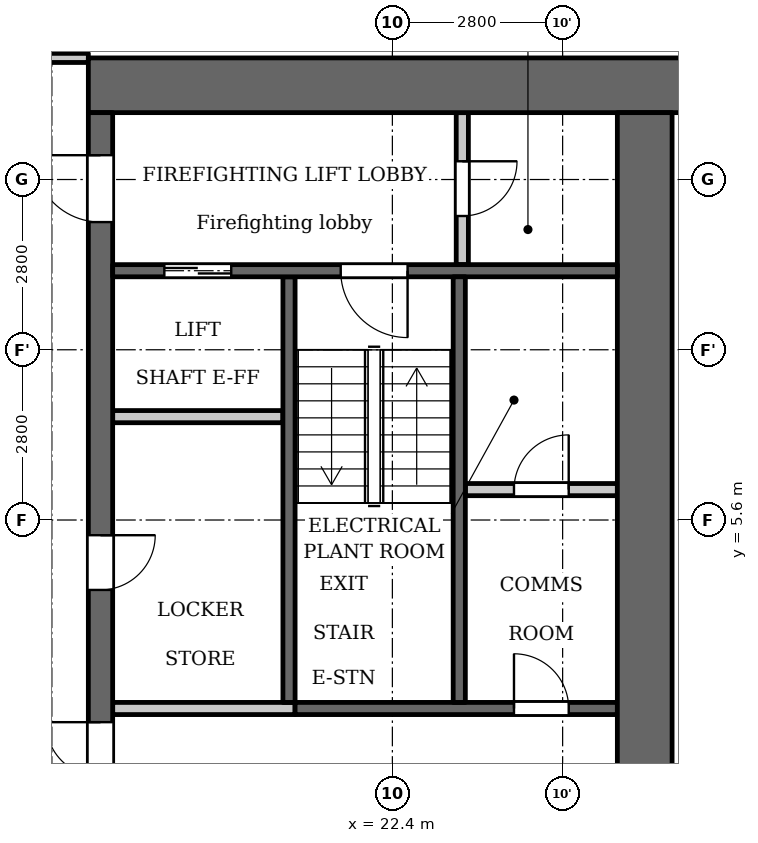
"""IFC4 building model, lengths in metres.
Left out: names, types, materials, properties, quantities, classifications, styles, units other than length and angle.
Written with IfcOpenShell. Run it as: python <this file> out.ifc"""

import sys

from ifc_helpers import new_model, si_unit, direction, frame, frame_2d, origin, place, context, subcontext, project, spatial, rectangle, extrude, element, fill, save


model = new_model("IFC4")
c1 = context("Model", 3, precision=1e-05, world=origin(), true_north=direction((0.0, 1.0)))
c2 = subcontext(c1, "Body", "Model", "MODEL_VIEW")
j1 = project(units=[si_unit("LENGTHUNIT", "METRE"), si_unit("PLANEANGLEUNIT", "RADIAN")], contexts=[c1])
p1 = place(None, origin())
s1 = spatial("IfcSite", under=j1, at=p1, CompositionType="ELEMENT")
p2 = place(p1, origin())
s2 = spatial("IfcBuilding", under=s1, at=p2, CompositionType="ELEMENT")
p3 = place(p2, frame((0.0, 0.0, 55.0)))
s3 = spatial("IfcBuildingStorey", under=s2, at=p3, CompositionType="ELEMENT", Elevation=55.0)
p4 = place(p3, frame((20.7, 2.6, 0.0), z_axis=(0.0, 0.0, 1.0), x_axis=(0.0, 1.0, 0.0)))
e1 = element("IfcWall", 1, at=p4, inside=s3, PredefinedType="SHEAR", context=c2, shape_type="SweptSolid", body=[
    extrude(rectangle(XDim=7.0, YDim=0.2, at=frame_2d((3.5, 0.0))), origin(), (0.0, 0.0, 1.0), 3.2),
])
p5 = place(p3, frame((20.8, 2.5, 0.0), z_axis=(0.0, 0.0, 1.0), x_axis=(1.0, 0.0, 0.0)))
e2 = element("IfcWall", 2, at=p5, inside=s3, PredefinedType="SHEAR", context=c2, shape_type="SweptSolid", body=[
    extrude(rectangle(XDim=5.3, YDim=0.2, at=frame_2d((2.65, 0.0))), origin(), (0.0, 0.0, 1.0), 3.2),
])
p6 = place(p5, frame((3.6, 0.0, 0.0)))
e3 = element("IfcOpeningElement", 3, at=p6, cuts=e2, PredefinedType="OPENING", context=c2, shape_type="SweptSolid", body=[
    extrude(rectangle(XDim=0.9, YDim=2.1, at=frame_2d((0.45, 1.05))), frame((0.0, 0.11, 0.0), z_axis=(0.0, -1.0, 0.0), x_axis=(1.0, 0.0, 0.0)), (0.0, 0.0, 1.0), 0.22),
])
p7 = place(p3, frame((17.4, 12.75, 0.0), z_axis=(0.0, 0.0, 1.0), x_axis=(1.0, 0.0, 0.0)))
e4 = element("IfcWall", 4, at=p7, inside=s3, PredefinedType="SHEAR", context=c2, shape_type="SweptSolid", body=[
    extrude(rectangle(XDim=10.4, YDim=0.9, at=frame_2d((5.2, 0.0))), origin(), (0.0, 0.0, 1.0), 3.2),
])
p8 = place(p3, frame((17.6, -12.3, 0.0), z_axis=(0.0, 0.0, 1.0), x_axis=(0.0, 1.0, 0.0)))
e5 = element("IfcWall", 5, at=p8, inside=s3, PredefinedType="SHEAR", context=c2, shape_type="SweptSolid", body=[
    extrude(rectangle(XDim=24.6, YDim=0.4, at=frame_2d((12.3, 0.0))), origin(), (0.0, 0.0, 1.0), 3.2),
])
p9 = place(p8, frame((6.0, 0.0, 0.0)))
e6 = element("IfcOpeningElement", 6, at=p9, cuts=e5, PredefinedType="OPENING", context=c2, shape_type="SweptSolid", body=[
    extrude(rectangle(XDim=1.1, YDim=2.1, at=frame_2d((0.55, 1.05))), frame((0.0, 0.21, 0.0), z_axis=(0.0, -1.0, 0.0), x_axis=(1.0, 0.0, 0.0)), (0.0, 0.0, 1.0), 0.42),
])
p10 = place(p8, frame((8.4, 0.0, 0.0)))
e7 = element("IfcOpeningElement", 7, at=p10, cuts=e5, PredefinedType="OPENING", context=c2, shape_type="SweptSolid", body=[
    extrude(rectangle(XDim=1.1, YDim=2.1, at=frame_2d((0.55, 1.05))), frame((0.0, 0.21, 0.0), z_axis=(0.0, -1.0, 0.0), x_axis=(1.0, 0.0, 0.0)), (0.0, 0.0, 1.0), 0.42),
])
p11 = place(p8, frame((10.8, 0.0, 0.0)))
e8 = element("IfcOpeningElement", 8, at=p11, cuts=e5, PredefinedType="OPENING", context=c2, shape_type="SweptSolid", body=[
    extrude(rectangle(XDim=1.1, YDim=2.1, at=frame_2d((0.55, 1.05))), frame((0.0, 0.21, 0.0), z_axis=(0.0, -1.0, 0.0), x_axis=(1.0, 0.0, 0.0)), (0.0, 0.0, 1.0), 0.42),
])
p12 = place(p8, frame((16.75, 0.0, 0.0)))
e9 = element("IfcOpeningElement", 9, at=p12, cuts=e5, PredefinedType="OPENING", context=c2, shape_type="SweptSolid", body=[
    extrude(rectangle(XDim=0.9, YDim=2.1, at=frame_2d((0.45, 1.05))), frame((0.0, 0.21, 0.0), z_axis=(0.0, -1.0, 0.0), x_axis=(1.0, 0.0, 0.0)), (0.0, 0.0, 1.0), 0.42),
])
p13 = place(p8, frame((22.8, 0.0, 0.0)))
e10 = element("IfcOpeningElement", 10, at=p13, cuts=e5, PredefinedType="OPENING", context=c2, shape_type="SweptSolid", body=[
    extrude(rectangle(XDim=1.1, YDim=2.1, at=frame_2d((0.55, 1.05))), frame((0.0, 0.21, 0.0), z_axis=(0.0, -1.0, 0.0), x_axis=(1.0, 0.0, 0.0)), (0.0, 0.0, 1.0), 0.42),
])
p14 = place(p8, frame((0.7, 0.0, 0.0)))
e11 = element("IfcOpeningElement", 11, at=p14, cuts=e5, PredefinedType="OPENING", context=c2, shape_type="SweptSolid", body=[
    extrude(rectangle(XDim=1.1, YDim=2.1, at=frame_2d((0.55, 1.05))), frame((0.0, 0.21, 0.0), z_axis=(0.0, -1.0, 0.0), x_axis=(1.0, 0.0, 0.0)), (0.0, 0.0, 1.0), 0.42),
])
p15 = place(p8, frame((12.775, 0.0, 0.0)))
e12 = element("IfcOpeningElement", 12, at=p15, cuts=e5, PredefinedType="OPENING", context=c2, shape_type="SweptSolid", body=[
    extrude(rectangle(XDim=1.8, YDim=2.1, at=frame_2d((0.9, 1.05))), frame((0.0, 0.21, 0.0), z_axis=(0.0, -1.0, 0.0), x_axis=(1.0, 0.0, 0.0)), (0.0, 0.0, 1.0), 0.42),
])
p16 = place(p3, frame((26.55, -12.3, 0.0), z_axis=(0.0, 0.0, 1.0), x_axis=(0.0, 1.0, 0.0)))
e13 = element("IfcWall", 13, at=p16, inside=s3, PredefinedType="SHEAR", context=c2, shape_type="SweptSolid", body=[
    extrude(rectangle(XDim=24.6, YDim=0.9, at=frame_2d((12.3, 0.0))), origin(), (0.0, 0.0, 1.0), 3.2),
])
p17 = place(p3, frame((23.55, 9.8, 0.0), z_axis=(0.0, 0.0, 1.0), x_axis=(0.0, 1.0, 0.0)))
e14 = element("IfcWall", 14, at=p17, inside=s3, PredefinedType="PARTITIONING", context=c2, shape_type="SweptSolid", body=[
    extrude(rectangle(XDim=2.5, YDim=0.2, at=frame_2d((1.25, 0.0))), origin(), (0.0, 0.0, 1.0), 3.2),
])
p18 = place(p17, frame((0.8, 0.0, 0.0)))
e15 = element("IfcOpeningElement", 15, at=p18, cuts=e14, PredefinedType="OPENING", context=c2, shape_type="SweptSolid", body=[
    extrude(rectangle(XDim=0.9, YDim=2.1, at=frame_2d((0.45, 1.05))), frame((0.0, 0.11, 0.0), z_axis=(0.0, -1.0, 0.0), x_axis=(1.0, 0.0, 0.0)), (0.0, 0.0, 1.0), 0.22),
])
p19 = place(p3, frame((23.6, 6.1, 0.0), z_axis=(0.0, 0.0, 1.0), x_axis=(1.0, 0.0, 0.0)))
e16 = element("IfcWall", 16, at=p19, inside=s3, PredefinedType="PARTITIONING", context=c2, shape_type="SweptSolid", body=[
    extrude(rectangle(XDim=2.5, YDim=0.2, at=frame_2d((1.25, 0.0))), origin(), (0.0, 0.0, 1.0), 3.2),
])
p20 = place(p19, frame((0.8, 0.0, 0.0)))
e17 = element("IfcOpeningElement", 17, at=p20, cuts=e16, PredefinedType="OPENING", context=c2, shape_type="SweptSolid", body=[
    extrude(rectangle(XDim=0.9, YDim=2.1, at=frame_2d((0.45, 1.05))), frame((0.0, 0.11, 0.0), z_axis=(0.0, -1.0, 0.0), x_axis=(1.0, 0.0, 0.0)), (0.0, 0.0, 1.0), 0.22),
])
p21 = place(p3, frame((17.8, 2.5, 0.0), z_axis=(0.0, 0.0, 1.0), x_axis=(1.0, 0.0, 0.0)))
e18 = element("IfcWall", 18, at=p21, inside=s3, PredefinedType="PARTITIONING", context=c2, shape_type="SweptSolid", body=[
    extrude(rectangle(XDim=3.0, YDim=0.2, at=frame_2d((1.5, 0.0))), origin(), (0.0, 0.0, 1.0), 3.2),
])
p22 = place(p3, frame((17.8, 7.3, 0.0), z_axis=(0.0, 0.0, 1.0), x_axis=(1.0, 0.0, 0.0)))
e19 = element("IfcWall", 19, at=p22, inside=s3, PredefinedType="PARTITIONING", context=c2, shape_type="SweptSolid", body=[
    extrude(rectangle(XDim=2.8, YDim=0.2, at=frame_2d((1.4, 0.0))), origin(), (0.0, 0.0, 1.0), 3.2),
])
p23 = place(p3, frame((17.8, 9.7, 0.0), z_axis=(0.0, 0.0, 1.0), x_axis=(1.0, 0.0, 0.0)))
e20 = element("IfcWall", 20, at=p23, inside=s3, PredefinedType="SHEAR", context=c2, shape_type="SweptSolid", body=[
    extrude(rectangle(XDim=8.3, YDim=0.2, at=frame_2d((4.15, 0.0))), origin(), (0.0, 0.0, 1.0), 3.2),
])
p24 = place(p23, frame((0.85, 0.0, 0.0)))
e21 = element("IfcOpeningElement", 21, at=p24, cuts=e20, PredefinedType="OPENING", context=c2, shape_type="SweptSolid", body=[
    extrude(rectangle(XDim=1.1, YDim=2.1, at=frame_2d((0.55, 1.05))), frame((0.0, 0.11, 0.0), z_axis=(0.0, -1.0, 0.0), x_axis=(1.0, 0.0, 0.0)), (0.0, 0.0, 1.0), 0.22),
])
p25 = place(p23, frame((3.75, 0.0, 0.0)))
e22 = element("IfcOpeningElement", 22, at=p25, cuts=e20, PredefinedType="OPENING", context=c2, shape_type="SweptSolid", body=[
    extrude(rectangle(XDim=1.1, YDim=2.1, at=frame_2d((0.55, 1.05))), frame((0.0, 0.11, 0.0), z_axis=(0.0, -1.0, 0.0), x_axis=(1.0, 0.0, 0.0)), (0.0, 0.0, 1.0), 0.22),
])
p26 = place(p3, frame((23.5, 2.6, 0.0), z_axis=(0.0, 0.0, 1.0), x_axis=(0.0, 1.0, 0.0)))
e23 = element("IfcWall", 23, at=p26, inside=s3, PredefinedType="SHEAR", context=c2, shape_type="SweptSolid", body=[
    extrude(rectangle(XDim=7.0, YDim=0.2, at=frame_2d((3.5, 0.0))), origin(), (0.0, 0.0, 1.0), 3.2),
])
p27 = place(p3, frame((-17.4, 13.2, 0.0), z_axis=(0.0, 0.0, 1.0), x_axis=(1.0, 0.0, 0.0)))
e24 = element("IfcWall", 24, at=p27, inside=s3, PredefinedType="PARTITIONING", context=c2, shape_type="SweptSolid", body=[
    extrude(rectangle(XDim=34.8, YDim=0.15, at=frame_2d((17.4, 0.0))), origin(), (0.0, 0.0, 1.0), 3.2),
])
p28 = place(p27, frame((0.75, 0.0, 0.0)))
e25 = element("IfcOpeningElement", 25, at=p28, cuts=e24, PredefinedType="OPENING", context=c2, shape_type="SweptSolid", body=[
    extrude(rectangle(XDim=1.0, YDim=2.1, at=frame_2d((0.5, 1.05))), frame((0.0, 0.085, 0.0), z_axis=(0.0, -1.0, 0.0), x_axis=(1.0, 0.0, 0.0)), (0.0, 0.0, 1.0), 0.17),
])
p29 = place(p27, frame((33.15, 0.0, 0.0)))
e26 = element("IfcOpeningElement", 26, at=p29, cuts=e24, PredefinedType="OPENING", context=c2, shape_type="SweptSolid", body=[
    extrude(rectangle(XDim=1.0, YDim=2.1, at=frame_2d((0.5, 1.05))), frame((0.0, 0.085, 0.0), z_axis=(0.0, -1.0, 0.0), x_axis=(1.0, 0.0, 0.0)), (0.0, 0.0, 1.0), 0.17),
])
p30 = place(p27, frame((6.85, 0.0, 0.0)))
e27 = element("IfcOpeningElement", 27, at=p30, cuts=e24, PredefinedType="OPENING", context=c2, shape_type="SweptSolid", body=[
    extrude(rectangle(XDim=1.0, YDim=2.1, at=frame_2d((0.5, 1.05))), frame((0.0, 0.085, 0.0), z_axis=(0.0, -1.0, 0.0), x_axis=(1.0, 0.0, 0.0)), (0.0, 0.0, 1.0), 0.17),
])
p31 = place(p27, frame((18.05, 0.0, 0.0)))
e28 = element("IfcOpeningElement", 28, at=p31, cuts=e24, PredefinedType="OPENING", context=c2, shape_type="SweptSolid", body=[
    extrude(rectangle(XDim=1.0, YDim=2.1, at=frame_2d((0.5, 1.05))), frame((0.0, 0.085, 0.0), z_axis=(0.0, -1.0, 0.0), x_axis=(1.0, 0.0, 0.0)), (0.0, 0.0, 1.0), 0.17),
])
p32 = place(p27, frame((29.25, 0.0, 0.0)))
e29 = element("IfcOpeningElement", 29, at=p32, cuts=e24, PredefinedType="OPENING", context=c2, shape_type="SweptSolid", body=[
    extrude(rectangle(XDim=1.0, YDim=2.1, at=frame_2d((0.5, 1.05))), frame((0.0, 0.085, 0.0), z_axis=(0.0, -1.0, 0.0), x_axis=(1.0, 0.0, 0.0)), (0.0, 0.0, 1.0), 0.17),
])
p33 = place(p12, origin())
e30 = element("IfcDoor", 30, at=p33, inside=s3, OperationType="SINGLE_SWING_RIGHT", PredefinedType="DOOR", context=c2, shape_type="SweptSolid", body=[
    extrude(rectangle(XDim=0.9, YDim=2.1, at=frame_2d((0.45, 1.05))), frame((0.0, 0.025, 0.0), z_axis=(0.0, -1.0, 0.0), x_axis=(1.0, 0.0, 0.0)), (0.0, 0.0, 1.0), 0.05),
])
fill(e9, e30)
p34 = place(p24, origin())
e31 = element("IfcDoor", 31, at=p34, inside=s3, OperationType="DOUBLE_DOOR_SLIDING", PredefinedType="DOOR", context=c2, shape_type="SweptSolid", body=[
    extrude(rectangle(XDim=1.1, YDim=2.1, at=frame_2d((0.55, 1.05))), frame((0.0, 0.025, 0.0), z_axis=(0.0, -1.0, 0.0), x_axis=(1.0, 0.0, 0.0)), (0.0, 0.0, 1.0), 0.05),
])
fill(e21, e31)
p35 = place(p13, origin())
e32 = element("IfcDoor", 32, at=p35, inside=s3, OperationType="SINGLE_SWING_LEFT", PredefinedType="DOOR", context=c2, shape_type="SweptSolid", body=[
    extrude(rectangle(XDim=1.1, YDim=2.1, at=frame_2d((0.55, 1.05))), frame((0.0, 0.025, 0.0), z_axis=(0.0, -1.0, 0.0), x_axis=(1.0, 0.0, 0.0)), (0.0, 0.0, 1.0), 0.05),
])
fill(e10, e32)
p36 = place(p18, origin())
e33 = element("IfcDoor", 33, at=p36, inside=s3, OperationType="SINGLE_SWING_RIGHT", PredefinedType="DOOR", context=c2, shape_type="SweptSolid", body=[
    extrude(rectangle(XDim=0.9, YDim=2.1, at=frame_2d((0.45, 1.05))), frame((0.0, 0.025, 0.0), z_axis=(0.0, -1.0, 0.0), x_axis=(1.0, 0.0, 0.0)), (0.0, 0.0, 1.0), 0.05),
])
fill(e15, e33)
p37 = place(p25, origin())
e34 = element("IfcDoor", 34, at=p37, inside=s3, OperationType="SINGLE_SWING_RIGHT", PredefinedType="DOOR", context=c2, shape_type="SweptSolid", body=[
    extrude(rectangle(XDim=1.1, YDim=2.1, at=frame_2d((0.55, 1.05))), frame((0.0, 0.025, 0.0), z_axis=(0.0, -1.0, 0.0), x_axis=(1.0, 0.0, 0.0)), (0.0, 0.0, 1.0), 0.05),
])
fill(e22, e34)
p38 = place(p15, origin())
e35 = element("IfcDoor", 35, at=p38, inside=s3, OperationType="DOUBLE_DOOR_SINGLE_SWING", PredefinedType="DOOR", context=c2, shape_type="SweptSolid", body=[
    extrude(rectangle(XDim=1.8, YDim=2.1, at=frame_2d((0.9, 1.05))), frame((0.0, 0.025, 0.0), z_axis=(0.0, -1.0, 0.0), x_axis=(1.0, 0.0, 0.0)), (0.0, 0.0, 1.0), 0.05),
])
fill(e12, e35)
p39 = place(p20, origin())
e36 = element("IfcDoor", 36, at=p39, inside=s3, OperationType="SINGLE_SWING_LEFT", PredefinedType="DOOR", context=c2, shape_type="SweptSolid", body=[
    extrude(rectangle(XDim=0.9, YDim=2.1, at=frame_2d((0.45, 1.05))), frame((0.0, 0.025, 0.0), z_axis=(0.0, -1.0, 0.0), x_axis=(1.0, 0.0, 0.0)), (0.0, 0.0, 1.0), 0.05),
])
fill(e17, e36)
p40 = place(p6, origin())
e37 = element("IfcDoor", 37, at=p40, inside=s3, OperationType="SINGLE_SWING_RIGHT", PredefinedType="DOOR", context=c2, shape_type="SweptSolid", body=[
    extrude(rectangle(XDim=0.9, YDim=2.1, at=frame_2d((0.45, 1.05))), frame((0.0, 0.025, 0.0), z_axis=(0.0, -1.0, 0.0), x_axis=(1.0, 0.0, 0.0)), (0.0, 0.0, 1.0), 0.05),
])
fill(e3, e37)
save(model, sys.argv[1])
